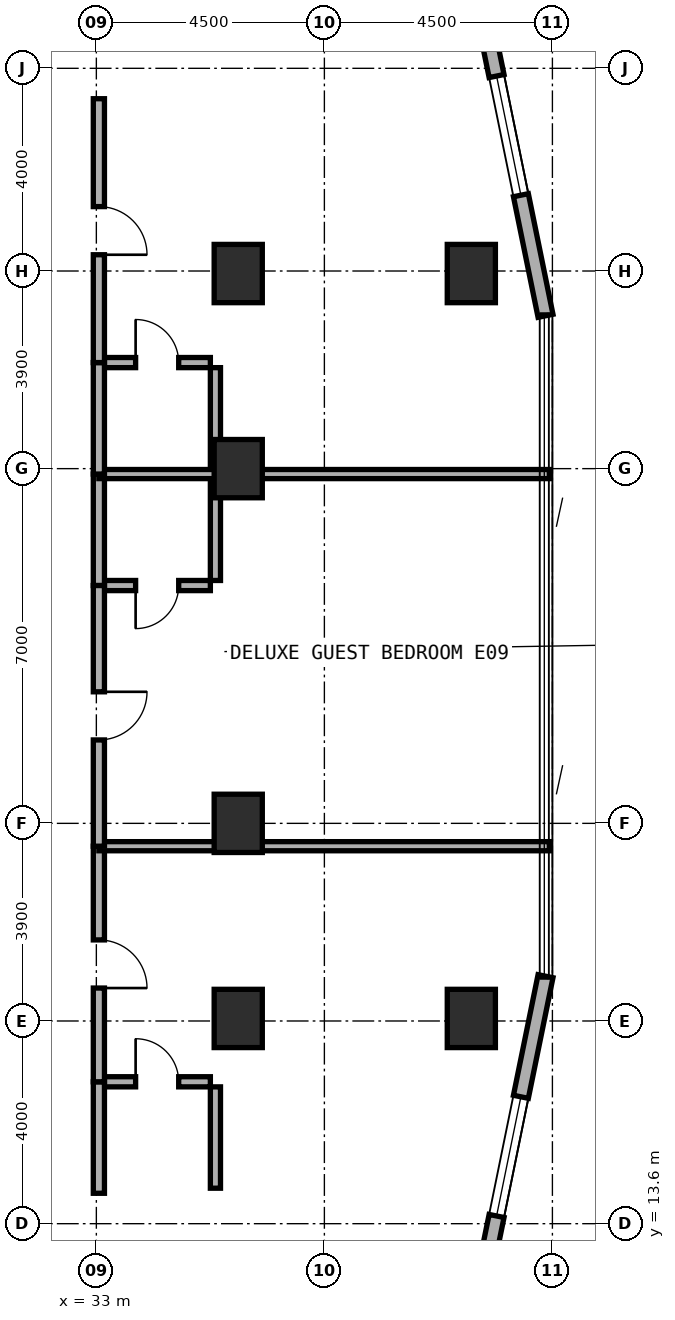
"""IFC4 building model, lengths in metres.
Left out: names, types, materials, properties, quantities, classifications, styles, units other than length and angle.
Written with IfcOpenShell. Run it as: python <this file> out.ifc"""

import sys

from ifc_helpers import new_model, si_unit, direction, frame, frame_2d, origin, origin_2d, place, context, subcontext, project, spatial, rectangle, extrude, element, fill, save


model = new_model("IFC4")
c1 = context("Model", 3, precision=1e-05, world=origin(), true_north=direction((0.0, 1.0)))
c2 = subcontext(c1, "Body", "Model", "MODEL_VIEW")
j1 = project(units=[si_unit("LENGTHUNIT", "METRE"), si_unit("PLANEANGLEUNIT", "RADIAN")], contexts=[c1])
p1 = place(None, origin())
s1 = spatial("IfcSite", under=j1, at=p1, CompositionType="ELEMENT")
p2 = place(p1, origin())
s2 = spatial("IfcBuilding", under=s1, at=p2, CompositionType="ELEMENT")
p3 = place(p2, frame((0.0, 0.0, 69.5)))
s3 = spatial("IfcBuildingStorey", under=s2, at=p3, CompositionType="ELEMENT", Elevation=69.5)
for number, where, z_axis, x_axis in (
    (1, (35.8, 21.5, 0.0), (0.0, 0.0, 1.0), (1.0, 0.0, 0.0)),
    (2, (35.8, 28.5, 0.0), (0.0, 0.0, 1.0), (1.0, 0.0, 0.0)),
    (3, (35.8, 17.65, 0.0), (0.0, 0.0, 1.0), (1.0, 0.0, 0.0)),
    (4, (35.8, 32.35, 0.0), (0.0, 0.0, 1.0), (1.0, 0.0, 0.0)),
    (5, (40.4, 17.65, 0.0), (0.0, 0.0, 1.0), (1.0, 0.0, 0.0)),
    (6, (40.4, 32.35, 0.0), (0.0, 0.0, 1.0), (1.0, 0.0, 0.0)),
):
    element("IfcColumn", number, at=place(p3, frame(where, z_axis=z_axis, x_axis=x_axis)), inside=s3, PredefinedType="COLUMN", context=c2, shape_type="SweptSolid", body=[
        extrude(rectangle(XDim=0.95, YDim=1.15, at=origin_2d()), origin(), (0.0, 0.0, 1.0), 3.5),
    ])
p4 = place(p3, frame((39.851, 8.622, 0.0), z_axis=(0.0, 0.0, 1.0), x_axis=(0.199990901713, 0.979797754249, 0.0)))
e7 = element("IfcWall", 7, at=p4, inside=s3, PredefinedType="STANDARD", context=c2, shape_type="SweptSolid", body=[
    extrude(rectangle(XDim=10.065, YDim=0.3, at=frame_2d((5.033, 0.0))), origin(), (0.0, 0.0, 1.0), 3.22),
])
p5 = place(p4, frame((0.378, 0.0, 0.85)))
e8 = element("IfcOpeningElement", 8, at=p5, cuts=e7, PredefinedType="OPENING", context=c2, shape_type="SweptSolid", body=[
    extrude(rectangle(XDim=1.8, YDim=1.5, at=frame_2d((0.9, 0.75))), frame((0.0, 0.16, 0.0), z_axis=(0.0, -1.0, 0.0), x_axis=(1.0, 0.0, 0.0)), (0.0, 0.0, 1.0), 0.32),
])
p6 = place(p4, frame((5.236, 0.0, 0.8)))
e9 = element("IfcOpeningElement", 9, at=p6, cuts=e7, PredefinedType="OPENING", context=c2, shape_type="SweptSolid", body=[
    extrude(rectangle(XDim=2.4, YDim=1.6, at=frame_2d((1.2, 0.8))), frame((0.0, 0.16, 0.0), z_axis=(0.0, -1.0, 0.0), x_axis=(1.0, 0.0, 0.0)), (0.0, 0.0, 1.0), 0.32),
])
p7 = place(p3, frame((41.864, 31.516, 0.0), z_axis=(0.0, 0.0, 1.0), x_axis=(-0.199990901713, 0.979797754249, 0.0)))
e10 = element("IfcWall", 10, at=p7, inside=s3, PredefinedType="STANDARD", context=c2, shape_type="SweptSolid", body=[
    extrude(rectangle(XDim=10.065, YDim=0.3, at=frame_2d((5.033, 0.0))), origin(), (0.0, 0.0, 1.0), 3.22),
])
p8 = place(p7, frame((2.429, 0.0, 0.8)))
e11 = element("IfcOpeningElement", 11, at=p8, cuts=e10, PredefinedType="OPENING", context=c2, shape_type="SweptSolid", body=[
    extrude(rectangle(XDim=2.4, YDim=1.6, at=frame_2d((1.2, 0.8))), frame((0.0, 0.16, 0.0), z_axis=(0.0, -1.0, 0.0), x_axis=(1.0, 0.0, 0.0)), (0.0, 0.0, 1.0), 0.32),
])
p9 = place(p7, frame((7.887, 0.0, 0.85)))
e12 = element("IfcOpeningElement", 12, at=p9, cuts=e10, PredefinedType="OPENING", context=c2, shape_type="SweptSolid", body=[
    extrude(rectangle(XDim=1.8, YDim=1.5, at=frame_2d((0.9, 0.75))), frame((0.0, 0.16, 0.0), z_axis=(0.0, -1.0, 0.0), x_axis=(1.0, 0.0, 0.0)), (0.0, 0.0, 1.0), 0.32),
])
p10 = place(p3, frame((33.15, 16.4, 0.0), z_axis=(0.0, 0.0, 1.0), x_axis=(1.0, 0.0, 0.0)))
e13 = element("IfcWall", 13, at=p10, inside=s3, PredefinedType="PLUMBINGWALL", context=c2, shape_type="SweptSolid", body=[
    extrude(rectangle(XDim=2.1, YDim=0.2, at=frame_2d((1.05, 0.0))), origin(), (0.0, 0.0, 1.0), 3.22),
])
p11 = place(p10, frame((0.625, 0.0, 0.0)))
e14 = element("IfcOpeningElement", 14, at=p11, cuts=e13, PredefinedType="OPENING", context=c2, shape_type="SweptSolid", body=[
    extrude(rectangle(XDim=0.85, YDim=2.1, at=frame_2d((0.425, 1.05))), frame((0.0, 0.11, 0.0), z_axis=(0.0, -1.0, 0.0), x_axis=(1.0, 0.0, 0.0)), (0.0, 0.0, 1.0), 0.22),
])
p12 = place(p3, frame((35.35, 14.3, 0.0), z_axis=(0.0, 0.0, 1.0), x_axis=(0.0, 1.0, 0.0)))
e15 = element("IfcWall", 15, at=p12, inside=s3, PredefinedType="PLUMBINGWALL", context=c2, shape_type="SweptSolid", body=[
    extrude(rectangle(XDim=2.0, YDim=0.2, at=frame_2d((1.0, 0.0))), origin(), (0.0, 0.0, 1.0), 2.745),
])
p13 = place(p3, frame((33.05, 14.2, 0.0), z_axis=(0.0, 0.0, 1.0), x_axis=(0.0, 1.0, 0.0)))
e16 = element("IfcWall", 16, at=p13, inside=s3, PredefinedType="SOLIDWALL", context=c2, shape_type="SweptSolid", body=[
    extrude(rectangle(XDim=2.2, YDim=0.22, at=frame_2d((1.1, 0.0))), origin(), (0.0, 0.0, 1.0), 3.22),
])
p14 = place(p3, frame((33.05, 16.4, 0.0), z_axis=(0.0, 0.0, 1.0), x_axis=(0.0, 1.0, 0.0)))
e17 = element("IfcWall", 17, at=p14, inside=s3, PredefinedType="SOLIDWALL", context=c2, shape_type="SweptSolid", body=[
    extrude(rectangle(XDim=4.649, YDim=0.22, at=frame_2d((2.325, 0.0))), origin(), (0.0, 0.0, 1.0), 2.495),
])
p15 = place(p14, frame((1.85, 0.0, 0.0)))
e18 = element("IfcOpeningElement", 18, at=p15, cuts=e17, PredefinedType="OPENING", context=c2, shape_type="SweptSolid", body=[
    extrude(rectangle(XDim=0.95, YDim=2.1, at=frame_2d((0.475, 1.05))), frame((0.0, 0.12, 0.0), z_axis=(0.0, -1.0, 0.0), x_axis=(1.0, 0.0, 0.0)), (0.0, 0.0, 1.0), 0.24),
])
p16 = place(p3, frame((33.05, 21.049, 0.0), z_axis=(0.0, 0.0, 1.0), x_axis=(1.0, 0.0, 0.0)))
e19 = element("IfcWall", 19, at=p16, inside=s3, PredefinedType="SOLIDWALL", context=c2, shape_type="SweptSolid", body=[
    extrude(rectangle(XDim=8.89, YDim=0.18, at=frame_2d((4.445, 0.0))), origin(), (0.0, 0.0, 1.0), 2.745),
])
p17 = place(p3, frame((33.15, 26.193, 0.0), z_axis=(0.0, 0.0, 1.0), x_axis=(1.0, 0.0, 0.0)))
e20 = element("IfcWall", 20, at=p17, inside=s3, PredefinedType="PLUMBINGWALL", context=c2, shape_type="SweptSolid", body=[
    extrude(rectangle(XDim=2.1, YDim=0.2, at=frame_2d((1.05, 0.0))), origin(), (0.0, 0.0, 1.0), 3.22),
])
p18 = place(p17, frame((0.625, 0.0, 0.0)))
e21 = element("IfcOpeningElement", 21, at=p18, cuts=e20, PredefinedType="OPENING", context=c2, shape_type="SweptSolid", body=[
    extrude(rectangle(XDim=0.85, YDim=2.1, at=frame_2d((0.425, 1.05))), frame((0.0, 0.11, 0.0), z_axis=(0.0, -1.0, 0.0), x_axis=(1.0, 0.0, 0.0)), (0.0, 0.0, 1.0), 0.22),
])
p19 = place(p3, frame((35.35, 26.293, 0.0), z_axis=(0.0, 0.0, 1.0), x_axis=(0.0, 1.0, 0.0)))
e22 = element("IfcWall", 22, at=p19, inside=s3, PredefinedType="PLUMBINGWALL", context=c2, shape_type="SweptSolid", body=[
    extrude(rectangle(XDim=2.0, YDim=0.2, at=frame_2d((1.0, 0.0))), origin(), (0.0, 0.0, 1.0), 3.22),
])
p20 = place(p3, frame((33.05, 26.193, 0.0), z_axis=(0.0, 0.0, 1.0), x_axis=(0.0, 1.0, 0.0)))
e23 = element("IfcWall", 23, at=p20, inside=s3, PredefinedType="SOLIDWALL", context=c2, shape_type="SweptSolid", body=[
    extrude(rectangle(XDim=2.2, YDim=0.22, at=frame_2d((1.1, 0.0))), origin(), (0.0, 0.0, 1.0), 3.22),
])
p21 = place(p3, frame((33.05, 21.049, 0.0), z_axis=(0.0, 0.0, 1.0), x_axis=(0.0, 1.0, 0.0)))
e24 = element("IfcWall", 24, at=p21, inside=s3, PredefinedType="SOLIDWALL", context=c2, shape_type="SweptSolid", body=[
    extrude(rectangle(XDim=5.144, YDim=0.22, at=frame_2d((2.572, 0.0))), origin(), (0.0, 0.0, 1.0), 2.495),
])
p22 = place(p21, frame((2.097, 0.0, 0.0)))
e25 = element("IfcOpeningElement", 25, at=p22, cuts=e24, PredefinedType="OPENING", context=c2, shape_type="SweptSolid", body=[
    extrude(rectangle(XDim=0.95, YDim=2.1, at=frame_2d((0.475, 1.05))), frame((0.0, 0.12, 0.0), z_axis=(0.0, -1.0, 0.0), x_axis=(1.0, 0.0, 0.0)), (0.0, 0.0, 1.0), 0.24),
])
p23 = place(p3, frame((33.05, 28.393, 0.0), z_axis=(0.0, 0.0, 1.0), x_axis=(1.0, 0.0, 0.0)))
e26 = element("IfcWall", 26, at=p23, inside=s3, PredefinedType="SOLIDWALL", context=c2, shape_type="SweptSolid", body=[
    extrude(rectangle(XDim=8.89, YDim=0.18, at=frame_2d((4.445, 0.0))), origin(), (0.0, 0.0, 1.0), 2.495),
])
p24 = place(p3, frame((33.15, 30.593, 0.0), z_axis=(0.0, 0.0, 1.0), x_axis=(1.0, 0.0, 0.0)))
e27 = element("IfcWall", 27, at=p24, inside=s3, PredefinedType="PLUMBINGWALL", context=c2, shape_type="SweptSolid", body=[
    extrude(rectangle(XDim=2.1, YDim=0.2, at=frame_2d((1.05, 0.0))), origin(), (0.0, 0.0, 1.0), 3.22),
])
p25 = place(p24, frame((0.625, 0.0, 0.0)))
e28 = element("IfcOpeningElement", 28, at=p25, cuts=e27, PredefinedType="OPENING", context=c2, shape_type="SweptSolid", body=[
    extrude(rectangle(XDim=0.85, YDim=2.1, at=frame_2d((0.425, 1.05))), frame((0.0, 0.11, 0.0), z_axis=(0.0, -1.0, 0.0), x_axis=(1.0, 0.0, 0.0)), (0.0, 0.0, 1.0), 0.22),
])
p26 = place(p3, frame((35.35, 28.493, 0.0), z_axis=(0.0, 0.0, 1.0), x_axis=(0.0, 1.0, 0.0)))
e29 = element("IfcWall", 29, at=p26, inside=s3, PredefinedType="PLUMBINGWALL", context=c2, shape_type="SweptSolid", body=[
    extrude(rectangle(XDim=2.0, YDim=0.2, at=frame_2d((1.0, 0.0))), origin(), (0.0, 0.0, 1.0), 2.495),
])
p27 = place(p3, frame((33.05, 28.393, 0.0), z_axis=(0.0, 0.0, 1.0), x_axis=(0.0, 1.0, 0.0)))
e30 = element("IfcWall", 30, at=p27, inside=s3, PredefinedType="SOLIDWALL", context=c2, shape_type="SweptSolid", body=[
    extrude(rectangle(XDim=2.2, YDim=0.22, at=frame_2d((1.1, 0.0))), origin(), (0.0, 0.0, 1.0), 2.495),
])
p28 = place(p3, frame((33.05, 30.593, 0.0), z_axis=(0.0, 0.0, 1.0), x_axis=(0.0, 1.0, 0.0)))
e31 = element("IfcWall", 31, at=p28, inside=s3, PredefinedType="SOLIDWALL", context=c2, shape_type="SweptSolid", body=[
    extrude(rectangle(XDim=5.207, YDim=0.22, at=frame_2d((2.604, 0.0))), origin(), (0.0, 0.0, 1.0), 2.495),
])
p29 = place(p28, frame((2.128, 0.0, 0.0)))
e32 = element("IfcOpeningElement", 32, at=p29, cuts=e31, PredefinedType="OPENING", context=c2, shape_type="SweptSolid", body=[
    extrude(rectangle(XDim=0.95, YDim=2.1, at=frame_2d((0.475, 1.05))), frame((0.0, 0.12, 0.0), z_axis=(0.0, -1.0, 0.0), x_axis=(1.0, 0.0, 0.0)), (0.0, 0.0, 1.0), 0.24),
])
p30 = place(p6, origin())
e33 = element("IfcWindow", 33, at=p30, inside=s3, PartitioningType="SINGLE_PANEL", PredefinedType="WINDOW", context=c2, shape_type="SweptSolid", body=[
    extrude(rectangle(XDim=2.4, YDim=1.6, at=frame_2d((1.2, 0.8))), frame((0.0, 0.03, 0.0), z_axis=(0.0, -1.0, 0.0), x_axis=(1.0, 0.0, 0.0)), (0.0, 0.0, 1.0), 0.06),
])
fill(e9, e33)
p31 = place(p8, origin())
e34 = element("IfcWindow", 34, at=p31, inside=s3, PartitioningType="SINGLE_PANEL", PredefinedType="WINDOW", context=c2, shape_type="SweptSolid", body=[
    extrude(rectangle(XDim=2.4, YDim=1.6, at=frame_2d((1.2, 0.8))), frame((0.0, 0.03, 0.0), z_axis=(0.0, -1.0, 0.0), x_axis=(1.0, 0.0, 0.0)), (0.0, 0.0, 1.0), 0.06),
])
fill(e11, e34)
p32 = place(p11, origin())
e35 = element("IfcDoor", 35, at=p32, inside=s3, OperationType="SINGLE_SWING_LEFT", PredefinedType="DOOR", context=c2, shape_type="SweptSolid", body=[
    extrude(rectangle(XDim=0.85, YDim=2.1, at=frame_2d((0.425, 1.05))), frame((0.0, 0.025, 0.0), z_axis=(0.0, -1.0, 0.0), x_axis=(1.0, 0.0, 0.0)), (0.0, 0.0, 1.0), 0.05),
])
fill(e14, e35)
p33 = place(p15, frame((0.95, 0.0, 0.0), z_axis=(0.0, 0.0, 1.0), x_axis=(-1.0, 0.0, 0.0)))
e36 = element("IfcDoor", 36, at=p33, inside=s3, OperationType="SINGLE_SWING_RIGHT", PredefinedType="DOOR", context=c2, shape_type="SweptSolid", body=[
    extrude(rectangle(XDim=0.95, YDim=2.1, at=frame_2d((0.475, 1.05))), frame((0.0, 0.025, 0.0), z_axis=(0.0, -1.0, 0.0), x_axis=(1.0, 0.0, 0.0)), (0.0, 0.0, 1.0), 0.05),
])
fill(e18, e36)
p34 = place(p18, frame((0.85, 0.0, 0.0), z_axis=(0.0, 0.0, 1.0), x_axis=(-1.0, 0.0, 0.0)))
e37 = element("IfcDoor", 37, at=p34, inside=s3, OperationType="SINGLE_SWING_RIGHT", PredefinedType="DOOR", context=c2, shape_type="SweptSolid", body=[
    extrude(rectangle(XDim=0.85, YDim=2.1, at=frame_2d((0.425, 1.05))), frame((0.0, 0.025, 0.0), z_axis=(0.0, -1.0, 0.0), x_axis=(1.0, 0.0, 0.0)), (0.0, 0.0, 1.0), 0.05),
])
fill(e21, e37)
p35 = place(p22, frame((0.95, 0.0, 0.0), z_axis=(0.0, 0.0, 1.0), x_axis=(-1.0, 0.0, 0.0)))
e38 = element("IfcDoor", 38, at=p35, inside=s3, OperationType="SINGLE_SWING_LEFT", PredefinedType="DOOR", context=c2, shape_type="SweptSolid", body=[
    extrude(rectangle(XDim=0.95, YDim=2.1, at=frame_2d((0.475, 1.05))), frame((0.0, 0.025, 0.0), z_axis=(0.0, -1.0, 0.0), x_axis=(1.0, 0.0, 0.0)), (0.0, 0.0, 1.0), 0.05),
])
fill(e25, e38)
p36 = place(p25, origin())
e39 = element("IfcDoor", 39, at=p36, inside=s3, OperationType="SINGLE_SWING_LEFT", PredefinedType="DOOR", context=c2, shape_type="SweptSolid", body=[
    extrude(rectangle(XDim=0.85, YDim=2.1, at=frame_2d((0.425, 1.05))), frame((0.0, 0.025, 0.0), z_axis=(0.0, -1.0, 0.0), x_axis=(1.0, 0.0, 0.0)), (0.0, 0.0, 1.0), 0.05),
])
fill(e28, e39)
p37 = place(p29, frame((0.95, 0.0, 0.0), z_axis=(0.0, 0.0, 1.0), x_axis=(-1.0, 0.0, 0.0)))
e40 = element("IfcDoor", 40, at=p37, inside=s3, OperationType="SINGLE_SWING_RIGHT", PredefinedType="DOOR", context=c2, shape_type="SweptSolid", body=[
    extrude(rectangle(XDim=0.95, YDim=2.1, at=frame_2d((0.475, 1.05))), frame((0.0, 0.025, 0.0), z_axis=(0.0, -1.0, 0.0), x_axis=(1.0, 0.0, 0.0)), (0.0, 0.0, 1.0), 0.05),
])
fill(e32, e40)
save(model, sys.argv[1])
